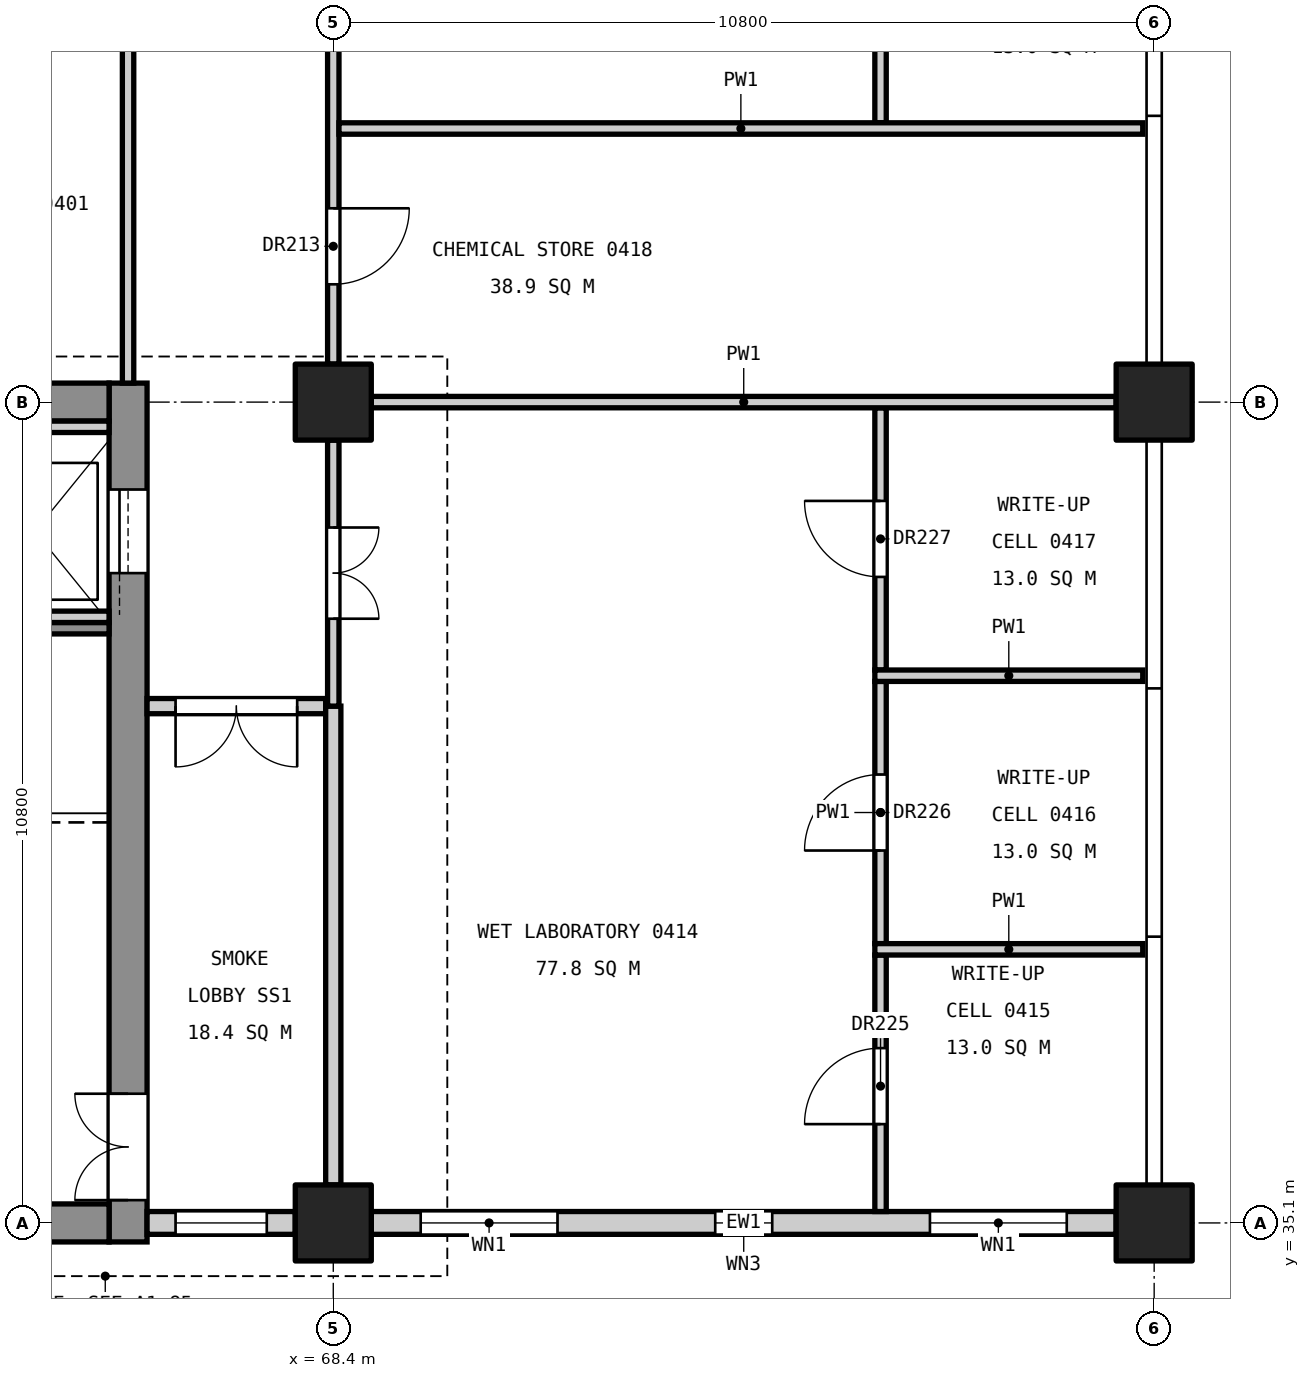
"""IFC4 building model, lengths in metres.
Left out: names, types, materials, properties, quantities, classifications, styles, units other than length and angle.
Written with IfcOpenShell. Run it as: python <this file> out.ifc"""

import sys

from ifc_helpers import new_model, si_unit, direction, frame, frame_2d, origin, origin_2d, place, context, subcontext, project, spatial, rectangle, extrude, element, fill, save


model = new_model("IFC4")
c1 = context("Model", 3, precision=1e-05, world=origin(), true_north=direction((0.0, 1.0)))
c2 = subcontext(c1, "Body", "Model", "MODEL_VIEW")
j1 = project(units=[si_unit("LENGTHUNIT", "METRE"), si_unit("PLANEANGLEUNIT", "RADIAN")], contexts=[c1])
p1 = place(None, origin())
s1 = spatial("IfcSite", under=j1, at=p1, CompositionType="ELEMENT")
p2 = place(p1, origin())
s2 = spatial("IfcBuilding", under=s1, at=p2, CompositionType="ELEMENT")
p3 = place(p2, frame((0.0, 0.0, 22.2)))
s3 = spatial("IfcBuildingStorey", under=s2, at=p3, CompositionType="ELEMENT", Elevation=22.2)
for number, where, z_axis, x_axis in (
    (1, (68.4, 35.1, 0.0), (0.0, 0.0, 1.0), (1.0, 0.0, 0.0)),
    (2, (68.4, 45.9, 0.0), (0.0, 0.0, 1.0), (1.0, 0.0, 0.0)),
    (3, (79.2, 35.1, 0.0), (0.0, 0.0, 1.0), (1.0, 0.0, 0.0)),
    (4, (79.2, 45.9, 0.0), (0.0, 0.0, 1.0), (1.0, 0.0, 0.0)),
):
    element("IfcColumn", number, at=place(p3, frame(where, z_axis=z_axis, x_axis=x_axis)), inside=s3, PredefinedType="COLUMN", context=c2, shape_type="SweptSolid", body=[
        extrude(rectangle(XDim=1.0, YDim=1.0, at=origin_2d()), origin(), (0.0, 0.0, 1.0), 4.8),
    ])
p4 = place(p3, frame((65.7, 34.85, 0.0), z_axis=(0.0, 0.0, 1.0), x_axis=(0.0, 1.0, 0.0)))
e5 = element("IfcWall", 5, at=p4, inside=s3, PredefinedType="SHEAR", context=c2, shape_type="SweptSolid", body=[
    extrude(rectangle(XDim=11.3, YDim=0.5, at=frame_2d((5.65, 0.0))), origin(), (0.0, 0.0, 1.0), 4.55),
])
p5 = place(p4, frame((0.55, 0.0, 0.0)))
e6 = element("IfcOpeningElement", 6, at=p5, cuts=e5, PredefinedType="OPENING", context=c2, shape_type="SweptSolid", body=[
    extrude(rectangle(XDim=1.4, YDim=2.1, at=frame_2d((0.7, 1.05))), frame((0.0, 0.26, 0.0), z_axis=(0.0, -1.0, 0.0), x_axis=(1.0, 0.0, 0.0)), (0.0, 0.0, 1.0), 0.52),
])
p6 = place(p4, frame((8.8, 0.0, 0.0)))
e7 = element("IfcOpeningElement", 7, at=p6, cuts=e5, PredefinedType="OPENING", context=c2, shape_type="SweptSolid", body=[
    extrude(rectangle(XDim=1.1, YDim=2.1, at=frame_2d((0.55, 1.05))), frame((0.0, 0.26, 0.0), z_axis=(0.0, -1.0, 0.0), x_axis=(1.0, 0.0, 0.0)), (0.0, 0.0, 1.0), 0.52),
])
p7 = place(p3, frame((61.45, 35.1, 0.0), z_axis=(0.0, 0.0, 1.0), x_axis=(1.0, 0.0, 0.0)))
e8 = element("IfcWall", 8, at=p7, inside=s3, PredefinedType="SHEAR", context=c2, shape_type="SweptSolid", body=[
    extrude(rectangle(XDim=4.0, YDim=0.5, at=frame_2d((2.0, 0.0))), origin(), (0.0, 0.0, 1.0), 4.55),
])
p8 = place(p7, frame((1.4, 0.0, 3.4)))
e9 = element("IfcOpeningElement", 9, at=p8, cuts=e8, PredefinedType="OPENING", context=c2, shape_type="SweptSolid", body=[
    extrude(rectangle(XDim=1.2, YDim=0.9, at=frame_2d((0.6, 0.45))), frame((0.0, 0.26, 0.0), z_axis=(0.0, -1.0, 0.0), x_axis=(1.0, 0.0, 0.0)), (0.0, 0.0, 1.0), 0.52),
])
p9 = place(p3, frame((61.45, 45.9, 0.0), z_axis=(0.0, 0.0, 1.0), x_axis=(1.0, 0.0, 0.0)))
e10 = element("IfcWall", 10, at=p9, inside=s3, PredefinedType="SHEAR", context=c2, shape_type="SweptSolid", body=[
    extrude(rectangle(XDim=4.0, YDim=0.5, at=frame_2d((2.0, 0.0))), origin(), (0.0, 0.0, 1.0), 4.55),
])
p10 = place(p3, frame((61.45, 42.925, 0.0), z_axis=(0.0, 0.0, 1.0), x_axis=(1.0, 0.0, 0.0)))
e11 = element("IfcWall", 11, at=p10, inside=s3, PredefinedType="SOLIDWALL", context=c2, shape_type="SweptSolid", body=[
    extrude(rectangle(XDim=4.0, YDim=0.15, at=frame_2d((2.0, 0.0))), origin(), (0.0, 0.0, 1.0), 4.55),
])
for number, where, z_axis, x_axis in (
    (12, (63.65, 43.075, 0.0), (0.0, 0.0, 1.0), (1.0, 0.0, 0.0)),
    (13, (63.65, 45.575, 0.0), (0.0, 0.0, 1.0), (1.0, 0.0, 0.0)),
):
    element("IfcWall", number, at=place(p3, frame(where, z_axis=z_axis, x_axis=x_axis)), inside=s3, PredefinedType="SOLIDWALL", context=c2, shape_type="SweptSolid", body=[
        extrude(rectangle(XDim=1.8, YDim=0.15, at=frame_2d((0.9, 0.0))), origin(), (0.0, 0.0, 1.0), 4.8),
    ])
p11 = place(p3, frame((65.95, 35.1, 0.0), z_axis=(0.0, 0.0, 1.0), x_axis=(1.0, 0.0, 0.0)))
e14 = element("IfcWall", 14, at=p11, inside=s3, PredefinedType="STANDARD", context=c2, shape_type="SweptSolid", body=[
    extrude(rectangle(XDim=1.95, YDim=0.3, at=frame_2d((0.975, 0.0))), origin(), (0.0, 0.0, 1.0), 3.85),
])
p12 = place(p11, frame((0.375, 0.0, 0.9)))
e15 = element("IfcOpeningElement", 15, at=p12, cuts=e14, PredefinedType="OPENING", context=c2, shape_type="SweptSolid", body=[
    extrude(rectangle(XDim=1.2, YDim=2.4, at=frame_2d((0.6, 1.2))), frame((0.0, 0.16, 0.0), z_axis=(0.0, -1.0, 0.0), x_axis=(1.0, 0.0, 0.0)), (0.0, 0.0, 1.0), 0.32),
])
p13 = place(p3, frame((68.9, 35.1, 0.0), z_axis=(0.0, 0.0, 1.0), x_axis=(1.0, 0.0, 0.0)))
e16 = element("IfcWall", 16, at=p13, inside=s3, PredefinedType="STANDARD", context=c2, shape_type="SweptSolid", body=[
    extrude(rectangle(XDim=9.8, YDim=0.3, at=frame_2d((4.9, 0.0))), origin(), (0.0, 0.0, 1.0), 3.85),
])
p14 = place(p13, frame((0.65, 0.0, 0.9)))
e17 = element("IfcOpeningElement", 17, at=p14, cuts=e16, PredefinedType="OPENING", context=c2, shape_type="SweptSolid", body=[
    extrude(rectangle(XDim=1.8, YDim=2.4, at=frame_2d((0.9, 1.2))), frame((0.0, 0.16, 0.0), z_axis=(0.0, -1.0, 0.0), x_axis=(1.0, 0.0, 0.0)), (0.0, 0.0, 1.0), 0.32),
])
p15 = place(p13, frame((4.525, 0.0, 0.8)))
e18 = element("IfcOpeningElement", 18, at=p15, cuts=e16, PredefinedType="OPENING", context=c2, shape_type="SweptSolid", body=[
    extrude(rectangle(XDim=0.75, YDim=1.2, at=frame_2d((0.375, 0.6))), frame((0.0, 0.16, 0.0), z_axis=(0.0, -1.0, 0.0), x_axis=(1.0, 0.0, 0.0)), (0.0, 0.0, 1.0), 0.32),
])
p16 = place(p13, frame((7.35, 0.0, 0.9)))
e19 = element("IfcOpeningElement", 19, at=p16, cuts=e16, PredefinedType="OPENING", context=c2, shape_type="SweptSolid", body=[
    extrude(rectangle(XDim=1.8, YDim=2.4, at=frame_2d((0.9, 1.2))), frame((0.0, 0.16, 0.0), z_axis=(0.0, -1.0, 0.0), x_axis=(1.0, 0.0, 0.0)), (0.0, 0.0, 1.0), 0.32),
])
p17 = place(p3, frame((65.7, 46.15, 0.0), z_axis=(0.0, 0.0, 1.0), x_axis=(0.0, 1.0, 0.0)))
e20 = element("IfcWall", 20, at=p17, inside=s3, PredefinedType="PARTITIONING", context=c2, shape_type="SweptSolid", body=[
    extrude(rectangle(XDim=10.4, YDim=0.15, at=frame_2d((5.2, 0.0))), origin(), (0.0, 0.0, 1.0), 3.55),
])
p18 = place(p17, frame((4.65, 0.0, 0.0)))
e21 = element("IfcOpeningElement", 21, at=p18, cuts=e20, PredefinedType="OPENING", context=c2, shape_type="SweptSolid", body=[
    extrude(rectangle(XDim=1.0, YDim=2.1, at=frame_2d((0.5, 1.05))), frame((0.0, 0.085, 0.0), z_axis=(0.0, -1.0, 0.0), x_axis=(1.0, 0.0, 0.0)), (0.0, 0.0, 1.0), 0.17),
])
p19 = place(p3, frame((65.95, 41.9, 0.0), z_axis=(0.0, 0.0, 1.0), x_axis=(1.0, 0.0, 0.0)))
e22 = element("IfcWall", 22, at=p19, inside=s3, PredefinedType="PARTITIONING", context=c2, shape_type="SweptSolid", body=[
    extrude(rectangle(XDim=2.35, YDim=0.2, at=frame_2d((1.175, 0.0))), origin(), (0.0, 0.0, 1.0), 3.55),
])
p20 = place(p19, frame((0.375, 0.0, 0.0)))
e23 = element("IfcOpeningElement", 23, at=p20, cuts=e22, PredefinedType="OPENING", context=c2, shape_type="SweptSolid", body=[
    extrude(rectangle(XDim=1.6, YDim=2.1, at=frame_2d((0.8, 1.05))), frame((0.0, 0.11, 0.0), z_axis=(0.0, -1.0, 0.0), x_axis=(1.0, 0.0, 0.0)), (0.0, 0.0, 1.0), 0.22),
])
p21 = place(p3, frame((68.4, 35.6, 0.0), z_axis=(0.0, 0.0, 1.0), x_axis=(0.0, 1.0, 0.0)))
e24 = element("IfcWall", 24, at=p21, inside=s3, PredefinedType="PARTITIONING", context=c2, shape_type="SweptSolid", body=[
    extrude(rectangle(XDim=6.3, YDim=0.2, at=frame_2d((3.15, 0.0))), origin(), (0.0, 0.0, 1.0), 3.55),
])
p22 = place(p3, frame((68.4, 41.9, 0.0), z_axis=(0.0, 0.0, 1.0), x_axis=(0.0, 1.0, 0.0)))
e25 = element("IfcWall", 25, at=p22, inside=s3, PredefinedType="PARTITIONING", context=c2, shape_type="SweptSolid", body=[
    extrude(rectangle(XDim=3.5, YDim=0.15, at=frame_2d((1.75, 0.0))), origin(), (0.0, 0.0, 1.0), 3.55),
])
p23 = place(p22, frame((1.15, 0.0, 0.0)))
e26 = element("IfcOpeningElement", 26, at=p23, cuts=e25, PredefinedType="OPENING", context=c2, shape_type="SweptSolid", body=[
    extrude(rectangle(XDim=1.2, YDim=2.1, at=frame_2d((0.6, 1.05))), frame((0.0, 0.085, 0.0), z_axis=(0.0, -1.0, 0.0), x_axis=(1.0, 0.0, 0.0)), (0.0, 0.0, 1.0), 0.17),
])
p24 = place(p3, frame((68.4, 46.4, 0.0), z_axis=(0.0, 0.0, 1.0), x_axis=(0.0, 1.0, 0.0)))
e27 = element("IfcWall", 27, at=p24, inside=s3, PredefinedType="PARTITIONING", context=c2, shape_type="SweptSolid", body=[
    extrude(rectangle(XDim=9.8, YDim=0.15, at=frame_2d((4.9, 0.0))), origin(), (0.0, 0.0, 1.0), 3.55),
])
p25 = place(p24, frame((1.05, 0.0, 0.0)))
e28 = element("IfcOpeningElement", 28, at=p25, cuts=e27, PredefinedType="OPENING", context=c2, shape_type="SweptSolid", body=[
    extrude(rectangle(XDim=1.0, YDim=2.1, at=frame_2d((0.5, 1.05))), frame((0.0, 0.085, 0.0), z_axis=(0.0, -1.0, 0.0), x_axis=(1.0, 0.0, 0.0)), (0.0, 0.0, 1.0), 0.17),
])
p26 = place(p24, frame((5.85, 0.0, 0.0)))
e29 = element("IfcOpeningElement", 29, at=p26, cuts=e27, PredefinedType="OPENING", context=c2, shape_type="SweptSolid", body=[
    extrude(rectangle(XDim=1.2, YDim=2.1, at=frame_2d((0.6, 1.05))), frame((0.0, 0.085, 0.0), z_axis=(0.0, -1.0, 0.0), x_axis=(1.0, 0.0, 0.0)), (0.0, 0.0, 1.0), 0.17),
])
p27 = place(p3, frame((75.6, 35.25, 0.0), z_axis=(0.0, 0.0, 1.0), x_axis=(0.0, 1.0, 0.0)))
e30 = element("IfcWall", 30, at=p27, inside=s3, PredefinedType="PARTITIONING", context=c2, shape_type="SweptSolid", body=[
    extrude(rectangle(XDim=3.375, YDim=0.15, at=frame_2d((1.688, 0.0))), origin(), (0.0, 0.0, 1.0), 3.55),
])
p28 = place(p27, frame((1.15, 0.0, 0.0)))
e31 = element("IfcOpeningElement", 31, at=p28, cuts=e30, PredefinedType="OPENING", context=c2, shape_type="SweptSolid", body=[
    extrude(rectangle(XDim=1.0, YDim=2.1, at=frame_2d((0.5, 1.05))), frame((0.0, 0.085, 0.0), z_axis=(0.0, -1.0, 0.0), x_axis=(1.0, 0.0, 0.0)), (0.0, 0.0, 1.0), 0.17),
])
p29 = place(p3, frame((75.6, 38.775, 0.0), z_axis=(0.0, 0.0, 1.0), x_axis=(0.0, 1.0, 0.0)))
e32 = element("IfcWall", 32, at=p29, inside=s3, PredefinedType="PARTITIONING", context=c2, shape_type="SweptSolid", body=[
    extrude(rectangle(XDim=3.45, YDim=0.15, at=frame_2d((1.725, 0.0))), origin(), (0.0, 0.0, 1.0), 3.55),
])
p30 = place(p29, frame((1.225, 0.0, 0.0)))
e33 = element("IfcOpeningElement", 33, at=p30, cuts=e32, PredefinedType="OPENING", context=c2, shape_type="SweptSolid", body=[
    extrude(rectangle(XDim=1.0, YDim=2.1, at=frame_2d((0.5, 1.05))), frame((0.0, 0.085, 0.0), z_axis=(0.0, -1.0, 0.0), x_axis=(1.0, 0.0, 0.0)), (0.0, 0.0, 1.0), 0.17),
])
p31 = place(p3, frame((75.6, 42.375, 0.0), z_axis=(0.0, 0.0, 1.0), x_axis=(0.0, 1.0, 0.0)))
e34 = element("IfcWall", 34, at=p31, inside=s3, PredefinedType="PARTITIONING", context=c2, shape_type="SweptSolid", body=[
    extrude(rectangle(XDim=3.45, YDim=0.15, at=frame_2d((1.725, 0.0))), origin(), (0.0, 0.0, 1.0), 3.55),
])
p32 = place(p31, frame((1.225, 0.0, 0.0)))
e35 = element("IfcOpeningElement", 35, at=p32, cuts=e34, PredefinedType="OPENING", context=c2, shape_type="SweptSolid", body=[
    extrude(rectangle(XDim=1.0, YDim=2.1, at=frame_2d((0.5, 1.05))), frame((0.0, 0.085, 0.0), z_axis=(0.0, -1.0, 0.0), x_axis=(1.0, 0.0, 0.0)), (0.0, 0.0, 1.0), 0.17),
])
for number, where, z_axis, x_axis in (
    (36, (75.525, 38.7, 0.0), (0.0, 0.0, 1.0), (1.0, 0.0, 0.0)),
    (37, (75.525, 42.3, 0.0), (0.0, 0.0, 1.0), (1.0, 0.0, 0.0)),
):
    element("IfcWall", number, at=place(p3, frame(where, z_axis=z_axis, x_axis=x_axis)), inside=s3, PredefinedType="PARTITIONING", context=c2, shape_type="SweptSolid", body=[
        extrude(rectangle(XDim=3.525, YDim=0.15, at=frame_2d((1.763, 0.0))), origin(), (0.0, 0.0, 1.0), 3.85),
    ])
p33 = place(p3, frame((75.6, 49.575, 0.0), z_axis=(0.0, 0.0, 1.0), x_axis=(0.0, 1.0, 0.0)))
e38 = element("IfcWall", 38, at=p33, inside=s3, PredefinedType="PARTITIONING", context=c2, shape_type="SweptSolid", body=[
    extrude(rectangle(XDim=3.45, YDim=0.15, at=frame_2d((1.725, 0.0))), origin(), (0.0, 0.0, 1.0), 3.55),
])
p34 = place(p33, frame((1.225, 0.0, 0.0)))
e39 = element("IfcOpeningElement", 39, at=p34, cuts=e38, PredefinedType="OPENING", context=c2, shape_type="SweptSolid", body=[
    extrude(rectangle(XDim=1.0, YDim=2.1, at=frame_2d((0.5, 1.05))), frame((0.0, 0.085, 0.0), z_axis=(0.0, -1.0, 0.0), x_axis=(1.0, 0.0, 0.0)), (0.0, 0.0, 1.0), 0.17),
])
p35 = place(p3, frame((68.9, 45.9, 0.0), z_axis=(0.0, 0.0, 1.0), x_axis=(1.0, 0.0, 0.0)))
e40 = element("IfcWall", 40, at=p35, inside=s3, PredefinedType="PARTITIONING", context=c2, shape_type="SweptSolid", body=[
    extrude(rectangle(XDim=9.8, YDim=0.15, at=frame_2d((4.9, 0.0))), origin(), (0.0, 0.0, 1.0), 3.85),
])
p36 = place(p3, frame((68.475, 49.5, 0.0), z_axis=(0.0, 0.0, 1.0), x_axis=(1.0, 0.0, 0.0)))
e41 = element("IfcWall", 41, at=p36, inside=s3, PredefinedType="PARTITIONING", context=c2, shape_type="SweptSolid", body=[
    extrude(rectangle(XDim=10.575, YDim=0.15, at=frame_2d((5.288, 0.0))), origin(), (0.0, 0.0, 1.0), 3.85),
])
p37 = place(p5, origin())
e42 = element("IfcDoor", 42, at=p37, inside=s3, OperationType="DOUBLE_DOOR_SINGLE_SWING", PredefinedType="DOOR", context=c2, shape_type="SweptSolid", body=[
    extrude(rectangle(XDim=1.4, YDim=2.1, at=frame_2d((0.7, 1.05))), frame((0.0, 0.025, 0.0), z_axis=(0.0, -1.0, 0.0), x_axis=(1.0, 0.0, 0.0)), (0.0, 0.0, 1.0), 0.05),
])
fill(e6, e42)
p38 = place(p6, origin())
e43 = element("IfcDoor", 43, at=p38, inside=s3, OperationType="SLIDING_TO_LEFT", PredefinedType="DOOR", context=c2, shape_type="SweptSolid", body=[
    extrude(rectangle(XDim=1.1, YDim=2.1, at=frame_2d((0.55, 1.05))), frame((0.0, 0.025, 0.0), z_axis=(0.0, -1.0, 0.0), x_axis=(1.0, 0.0, 0.0)), (0.0, 0.0, 1.0), 0.05),
])
fill(e7, e43)
p39 = place(p12, origin())
e44 = element("IfcWindow", 44, at=p39, inside=s3, PartitioningType="SINGLE_PANEL", PredefinedType="WINDOW", context=c2, shape_type="SweptSolid", body=[
    extrude(rectangle(XDim=1.2, YDim=2.4, at=frame_2d((0.6, 1.2))), frame((0.0, 0.03, 0.0), z_axis=(0.0, -1.0, 0.0), x_axis=(1.0, 0.0, 0.0)), (0.0, 0.0, 1.0), 0.06),
])
fill(e15, e44)
p40 = place(p14, origin())
e45 = element("IfcWindow", 45, at=p40, inside=s3, PartitioningType="SINGLE_PANEL", PredefinedType="WINDOW", context=c2, shape_type="SweptSolid", body=[
    extrude(rectangle(XDim=1.8, YDim=2.4, at=frame_2d((0.9, 1.2))), frame((0.0, 0.03, 0.0), z_axis=(0.0, -1.0, 0.0), x_axis=(1.0, 0.0, 0.0)), (0.0, 0.0, 1.0), 0.06),
])
fill(e17, e45)
p41 = place(p15, origin())
e46 = element("IfcWindow", 46, at=p41, inside=s3, PartitioningType="SINGLE_PANEL", PredefinedType="WINDOW", context=c2, shape_type="SweptSolid", body=[
    extrude(rectangle(XDim=0.75, YDim=1.2, at=frame_2d((0.375, 0.6))), frame((0.0, 0.03, 0.0), z_axis=(0.0, -1.0, 0.0), x_axis=(1.0, 0.0, 0.0)), (0.0, 0.0, 1.0), 0.06),
])
fill(e18, e46)
p42 = place(p16, origin())
e47 = element("IfcWindow", 47, at=p42, inside=s3, PartitioningType="SINGLE_PANEL", PredefinedType="WINDOW", context=c2, shape_type="SweptSolid", body=[
    extrude(rectangle(XDim=1.8, YDim=2.4, at=frame_2d((0.9, 1.2))), frame((0.0, 0.03, 0.0), z_axis=(0.0, -1.0, 0.0), x_axis=(1.0, 0.0, 0.0)), (0.0, 0.0, 1.0), 0.06),
])
fill(e19, e47)
p43 = place(p25, frame((1.0, 0.0, 0.0), z_axis=(0.0, 0.0, 1.0), x_axis=(-1.0, 0.0, 0.0)))
e48 = element("IfcDoor", 48, at=p43, inside=s3, OperationType="SINGLE_SWING_LEFT", PredefinedType="DOOR", context=c2, shape_type="SweptSolid", body=[
    extrude(rectangle(XDim=1.0, YDim=2.1, at=frame_2d((0.5, 1.05))), frame((0.0, 0.025, 0.0), z_axis=(0.0, -1.0, 0.0), x_axis=(1.0, 0.0, 0.0)), (0.0, 0.0, 1.0), 0.05),
])
fill(e28, e48)
p44 = place(p23, frame((1.2, 0.0, 0.0), z_axis=(0.0, 0.0, 1.0), x_axis=(-1.0, 0.0, 0.0)))
e49 = element("IfcDoor", 49, at=p44, inside=s3, OperationType="DOUBLE_DOOR_SINGLE_SWING", PredefinedType="DOOR", context=c2, shape_type="SweptSolid", body=[
    extrude(rectangle(XDim=1.2, YDim=2.1, at=frame_2d((0.6, 1.05))), frame((0.0, 0.025, 0.0), z_axis=(0.0, -1.0, 0.0), x_axis=(1.0, 0.0, 0.0)), (0.0, 0.0, 1.0), 0.05),
])
fill(e26, e49)
p45 = place(p28, origin())
e50 = element("IfcDoor", 50, at=p45, inside=s3, OperationType="SINGLE_SWING_LEFT", PredefinedType="DOOR", context=c2, shape_type="SweptSolid", body=[
    extrude(rectangle(XDim=1.0, YDim=2.1, at=frame_2d((0.5, 1.05))), frame((0.0, 0.025, 0.0), z_axis=(0.0, -1.0, 0.0), x_axis=(1.0, 0.0, 0.0)), (0.0, 0.0, 1.0), 0.05),
])
fill(e31, e50)
p46 = place(p30, origin())
e51 = element("IfcDoor", 51, at=p46, inside=s3, OperationType="SINGLE_SWING_LEFT", PredefinedType="DOOR", context=c2, shape_type="SweptSolid", body=[
    extrude(rectangle(XDim=1.0, YDim=2.1, at=frame_2d((0.5, 1.05))), frame((0.0, 0.025, 0.0), z_axis=(0.0, -1.0, 0.0), x_axis=(1.0, 0.0, 0.0)), (0.0, 0.0, 1.0), 0.05),
])
fill(e33, e51)
p47 = place(p32, origin())
e52 = element("IfcDoor", 52, at=p47, inside=s3, OperationType="SINGLE_SWING_RIGHT", PredefinedType="DOOR", context=c2, shape_type="SweptSolid", body=[
    extrude(rectangle(XDim=1.0, YDim=2.1, at=frame_2d((0.5, 1.05))), frame((0.0, 0.025, 0.0), z_axis=(0.0, -1.0, 0.0), x_axis=(1.0, 0.0, 0.0)), (0.0, 0.0, 1.0), 0.05),
])
fill(e35, e52)
p48 = place(p20, frame((1.6, 0.0, 0.0), z_axis=(0.0, 0.0, 1.0), x_axis=(-1.0, 0.0, 0.0)))
e53 = element("IfcDoor", 53, at=p48, inside=s3, OperationType="DOUBLE_DOOR_SINGLE_SWING", PredefinedType="DOOR", context=c2, shape_type="SweptSolid", body=[
    extrude(rectangle(XDim=1.6, YDim=2.1, at=frame_2d((0.8, 1.05))), frame((0.0, 0.025, 0.0), z_axis=(0.0, -1.0, 0.0), x_axis=(1.0, 0.0, 0.0)), (0.0, 0.0, 1.0), 0.05),
])
fill(e23, e53)
save(model, sys.argv[1])
